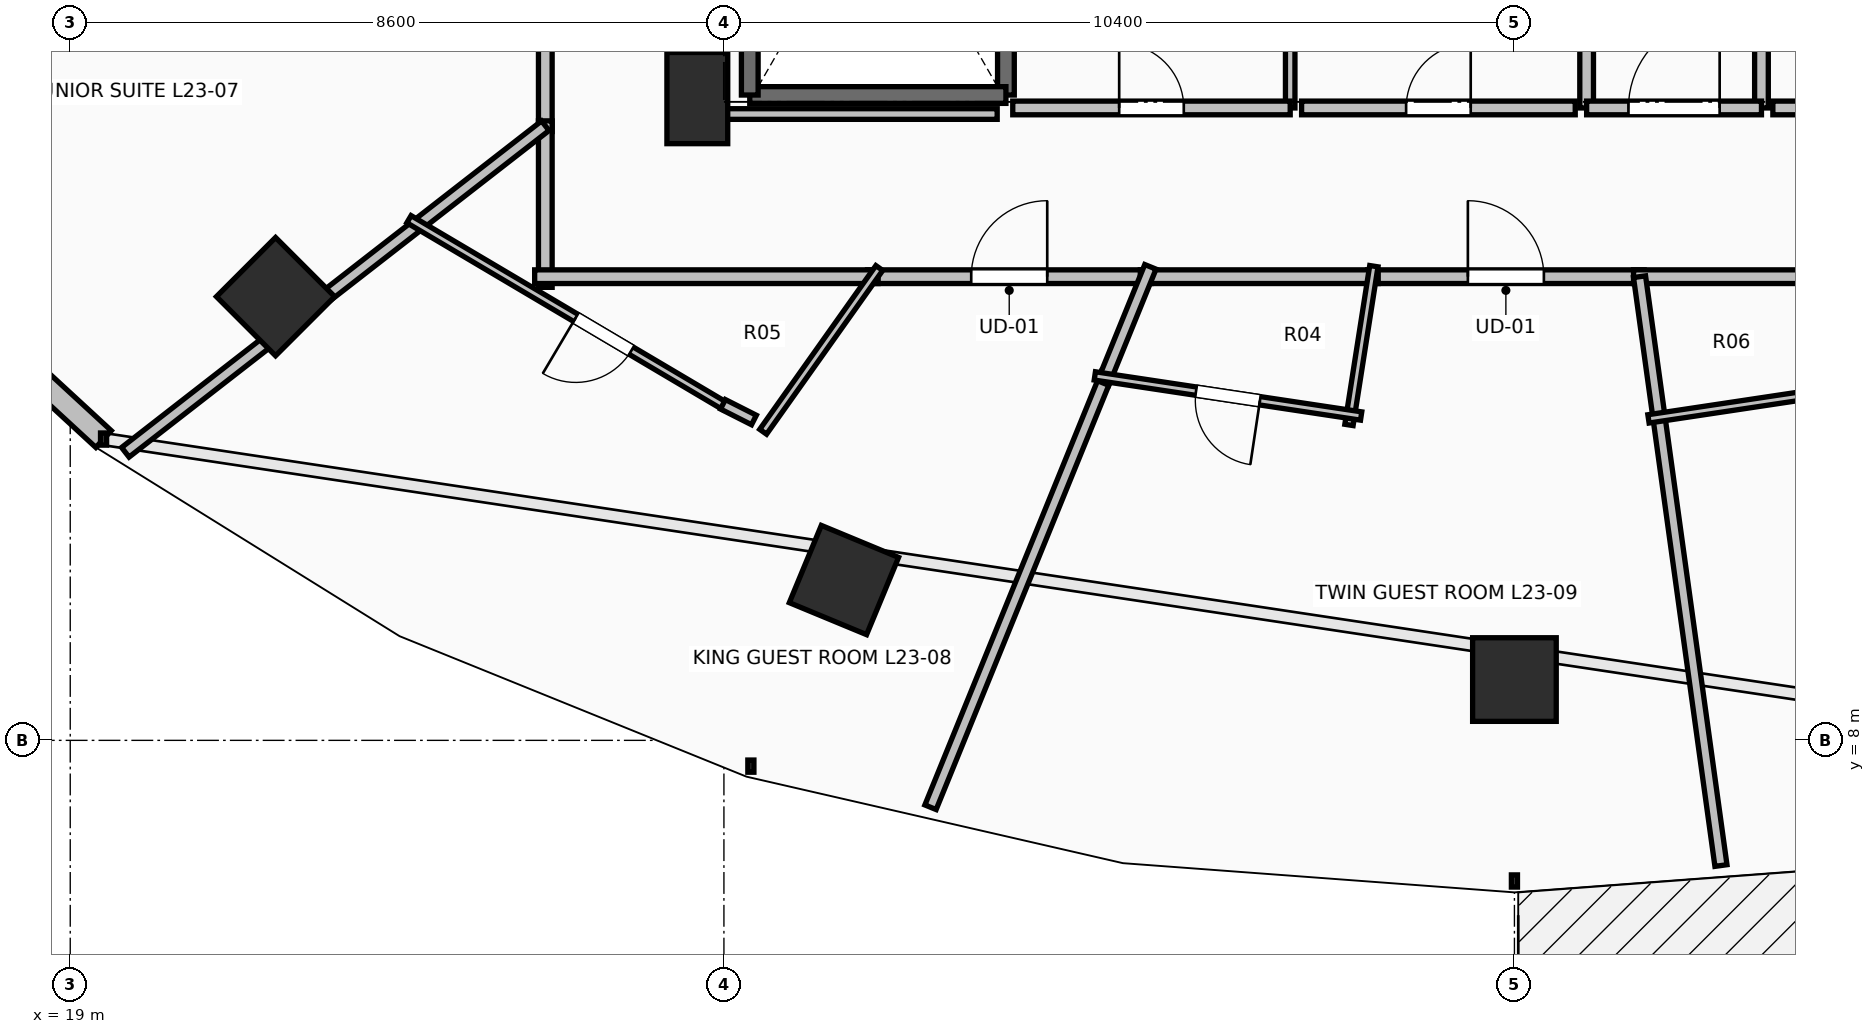
"""IFC4 building model, lengths in metres.
Left out: names, types, materials, properties, quantities, classifications, styles, units other than length and angle.
Written with IfcOpenShell. Run it as: python <this file> out.ifc"""

import sys

from ifc_helpers import new_model, si_unit, direction, frame, frame_2d, origin, origin_2d, place, context, subcontext, project, spatial, rectangle, extrude, element, fill, save


model = new_model("IFC4")
c1 = context("Model", 3, precision=1e-05, world=origin(), true_north=direction((0.0, 1.0)))
c2 = subcontext(c1, "Body", "Model", "MODEL_VIEW")
j1 = project(units=[si_unit("LENGTHUNIT", "METRE"), si_unit("PLANEANGLEUNIT", "RADIAN")], contexts=[c1])
p1 = place(None, origin())
s1 = spatial("IfcSite", under=j1, at=p1, CompositionType="ELEMENT")
p2 = place(p1, origin())
s2 = spatial("IfcBuilding", under=s1, at=p2, CompositionType="ELEMENT")
p3 = place(p2, frame((0.0, 0.0, 89.3)))
s3 = spatial("IfcBuildingStorey", under=s2, at=p3, CompositionType="ELEMENT", Elevation=89.3)
for number, where, z_axis, x_axis in (
    (1, (21.701, 13.838, 0.0), (0.0, 0.0, 1.0), (-0.707, -0.707, 0.0)),
    (2, (29.179, 10.109, 0.0), (0.0, 0.0, 1.0), (-0.383, -0.924, 0.0)),
    (3, (38.0, 8.8, 0.0), (0.0, 0.0, 1.0), (0.0, -1.0, 0.0)),
):
    element("IfcColumn", number, at=place(p3, frame(where, z_axis=z_axis, x_axis=x_axis)), inside=s3, PredefinedType="COLUMN", context=c2, shape_type="SweptSolid", body=[
        extrude(rectangle(XDim=1.1, YDim=1.1, at=origin_2d()), origin(), (0.0, 0.0, 1.0), 3.5),
    ])
p4 = place(p3, frame((27.25, 16.45, 0.0), z_axis=(0.0, 0.0, 1.0), x_axis=(1.0, 0.0, 0.0)))
e4 = element("IfcColumn", 4, at=p4, inside=s3, PredefinedType="PILASTER", context=c2, shape_type="SweptSolid", body=[
    extrude(rectangle(XDim=0.8, YDim=1.2, at=origin_2d()), origin(), (0.0, 0.0, 1.0), 3.5),
])
p5 = place(p3, frame((16.174, 14.972, 0.0), z_axis=(0.0, 0.0, 1.0), x_axis=(0.735416718093, -0.677615119924, 0.0)))
e5 = element("IfcWall", 5, at=p5, inside=s3, PredefinedType="STANDARD", context=c2, shape_type="SweptSolid", body=[
    extrude(rectangle(XDim=4.439, YDim=0.3, at=frame_2d((2.22, 0.0))), origin(), (0.0, 0.0, 1.0), 3.24),
])
p6 = place(p5, frame((1.32, 0.0, 0.85)))
e6 = element("IfcOpeningElement", 6, at=p6, cuts=e5, PredefinedType="OPENING", context=c2, shape_type="SweptSolid", body=[
    extrude(rectangle(XDim=1.8, YDim=2.19, at=frame_2d((0.9, 1.095))), frame((0.0, 0.165, 0.0), z_axis=(0.0, -1.0, 0.0), x_axis=(1.0, 0.0, 0.0)), (0.0, 0.0, 1.0), 0.33),
])
p7 = place(p3, frame((31.31, 23.91, 0.0), z_axis=(0.0, 0.0, 1.0), x_axis=(0.0, -1.0, 0.0)))
e7 = element("IfcWall", 7, at=p7, inside=s3, PredefinedType="SOLIDWALL", context=c2, shape_type="SweptSolid", body=[
    extrude(rectangle(XDim=7.42, YDim=0.22, at=frame_2d((3.71, 0.0))), origin(), (0.0, 0.0, 1.0), 3.24),
])
p8 = place(p3, frame((31.31, 16.49, 0.0), z_axis=(0.0, 0.0, 1.0), x_axis=(-1.0, 0.0, 0.0)))
e8 = element("IfcWall", 8, at=p8, inside=s3, PredefinedType="SOLIDWALL", context=c2, shape_type="SweptSolid", body=[
    extrude(rectangle(XDim=3.37, YDim=0.22, at=frame_2d((1.685, 0.0))), origin(), (0.0, 0.0, 1.0), 3.24),
])
p9 = place(p3, frame((27.94, 16.49, 0.0), z_axis=(0.0, 0.0, 1.0), x_axis=(0.0, 1.0, 0.0)))
e9 = element("IfcWall", 9, at=p9, inside=s3, PredefinedType="SOLIDWALL", context=c2, shape_type="SweptSolid", body=[
    extrude(rectangle(XDim=7.42, YDim=0.22, at=frame_2d((3.71, 0.0))), origin(), (0.0, 0.0, 1.0), 3.24),
])
p10 = place(p3, frame((41.25, 16.32, 0.0), z_axis=(0.0, 0.0, 1.0), x_axis=(0.0, 1.0, 0.0)))
e10 = element("IfcWall", 10, at=p10, inside=s3, PredefinedType="PARTITIONING", context=c2, shape_type="SweptSolid", body=[
    extrude(rectangle(XDim=7.88, YDim=0.18, at=frame_2d((3.94, 0.0))), origin(), (0.0, 0.0, 1.0), 3.24),
])
p11 = place(p10, frame((3.54, 0.0, 0.0)))
e11 = element("IfcOpeningElement", 11, at=p11, cuts=e10, PredefinedType="OPENING", context=c2, shape_type="SweptSolid", body=[
    extrude(rectangle(XDim=0.8, YDim=2.05, at=frame_2d((0.4, 1.025))), frame((0.0, 0.105, 0.0), z_axis=(0.0, -1.0, 0.0), x_axis=(1.0, 0.0, 0.0)), (0.0, 0.0, 1.0), 0.21),
])
p12 = place(p3, frame((38.95, 21.755, 0.0), z_axis=(0.0, 0.0, 1.0), x_axis=(0.0, -1.0, 0.0)))
e12 = element("IfcWall", 12, at=p12, inside=s3, PredefinedType="PARTITIONING", context=c2, shape_type="SweptSolid", body=[
    extrude(rectangle(XDim=5.435, YDim=0.18, at=frame_2d((2.717, 0.0))), origin(), (0.0, 0.0, 1.0), 3.24),
])
p13 = place(p12, frame((2.292, 0.0, 0.0)))
e13 = element("IfcOpeningElement", 13, at=p13, cuts=e12, PredefinedType="OPENING", context=c2, shape_type="SweptSolid", body=[
    extrude(rectangle(XDim=0.85, YDim=2.1, at=frame_2d((0.425, 1.05))), frame((0.0, 0.105, 0.0), z_axis=(0.0, -1.0, 0.0), x_axis=(1.0, 0.0, 0.0)), (0.0, 0.0, 1.0), 0.21),
])
p14 = place(p3, frame((38.95, 16.32, 0.0), z_axis=(0.0, 0.0, 1.0), x_axis=(1.0, 0.0, 0.0)))
e14 = element("IfcWall", 14, at=p14, inside=s3, PredefinedType="PARTITIONING", context=c2, shape_type="SweptSolid", body=[
    extrude(rectangle(XDim=2.3, YDim=0.18, at=frame_2d((1.15, 0.0))), origin(), (0.0, 0.0, 1.0), 3.24),
])
p15 = place(p14, frame((0.55, 0.0, 0.0)))
e15 = element("IfcOpeningElement", 15, at=p15, cuts=e14, PredefinedType="OPENING", context=c2, shape_type="SweptSolid", body=[
    extrude(rectangle(XDim=1.2, YDim=2.15, at=frame_2d((0.6, 1.075))), frame((0.0, 0.105, 0.0), z_axis=(0.0, -1.0, 0.0), x_axis=(1.0, 0.0, 0.0)), (0.0, 0.0, 1.0), 0.21),
])
p16 = place(p3, frame((41.4, 16.32, 0.0), z_axis=(0.0, 0.0, 1.0), x_axis=(1.0, 0.0, 0.0)))
e16 = element("IfcWall", 16, at=p16, inside=s3, PredefinedType="PARTITIONING", context=c2, shape_type="SweptSolid", body=[
    extrude(rectangle(XDim=3.2, YDim=0.18, at=frame_2d((1.6, 0.0))), origin(), (0.0, 0.0, 1.0), 3.24),
])
p17 = place(p16, frame((1.2, 0.0, 0.0)))
e17 = element("IfcOpeningElement", 17, at=p17, cuts=e16, PredefinedType="OPENING", context=c2, shape_type="SweptSolid", body=[
    extrude(rectangle(XDim=0.8, YDim=2.05, at=frame_2d((0.4, 1.025))), frame((0.0, 0.105, 0.0), z_axis=(0.0, -1.0, 0.0), x_axis=(1.0, 0.0, 0.0)), (0.0, 0.0, 1.0), 0.21),
])
p18 = place(p3, frame((35.05, 16.32, 0.0), z_axis=(0.0, 0.0, 1.0), x_axis=(0.0, 1.0, 0.0)))
e18 = element("IfcWall", 18, at=p18, inside=s3, PredefinedType="PARTITIONING", context=c2, shape_type="SweptSolid", body=[
    extrude(rectangle(XDim=5.13, YDim=0.125, at=frame_2d((2.565, 0.0))), origin(), (0.0, 0.0, 1.0), 3.24),
])
p19 = place(p3, frame((31.4, 16.32, 0.0), z_axis=(0.0, 0.0, 1.0), x_axis=(1.0, 0.0, 0.0)))
e19 = element("IfcWall", 19, at=p19, inside=s3, PredefinedType="PARTITIONING", context=c2, shape_type="SweptSolid", body=[
    extrude(rectangle(XDim=3.65, YDim=0.18, at=frame_2d((1.825, 0.0))), origin(), (0.0, 0.0, 1.0), 3.24),
])
p20 = place(p19, frame((1.4, 0.0, 0.0)))
e20 = element("IfcOpeningElement", 20, at=p20, cuts=e19, PredefinedType="OPENING", context=c2, shape_type="SweptSolid", body=[
    extrude(rectangle(XDim=0.85, YDim=2.1, at=frame_2d((0.425, 1.05))), frame((0.0, 0.105, 0.0), z_axis=(0.0, -1.0, 0.0), x_axis=(1.0, 0.0, 0.0)), (0.0, 0.0, 1.0), 0.21),
])
p21 = place(p3, frame((35.2, 16.32, 0.0), z_axis=(0.0, 0.0, 1.0), x_axis=(1.0, 0.0, 0.0)))
e21 = element("IfcWall", 21, at=p21, inside=s3, PredefinedType="PARTITIONING", context=c2, shape_type="SweptSolid", body=[
    extrude(rectangle(XDim=3.6, YDim=0.18, at=frame_2d((1.8, 0.0))), origin(), (0.0, 0.0, 1.0), 3.24),
])
p22 = place(p21, frame((1.375, 0.0, 0.0)))
e22 = element("IfcOpeningElement", 22, at=p22, cuts=e21, PredefinedType="OPENING", context=c2, shape_type="SweptSolid", body=[
    extrude(rectangle(XDim=0.85, YDim=2.1, at=frame_2d((0.425, 1.05))), frame((0.0, 0.105, 0.0), z_axis=(0.0, -1.0, 0.0), x_axis=(1.0, 0.0, 0.0)), (0.0, 0.0, 1.0), 0.21),
])
p23 = place(p3, frame((25.25, 21.147, 0.0), z_axis=(0.0, 0.0, 1.0), x_axis=(0.0, -1.0, 0.0)))
e23 = element("IfcWall", 23, at=p23, inside=s3, PredefinedType="PARTITIONING", context=c2, shape_type="SweptSolid", body=[
    extrude(rectangle(XDim=5.137, YDim=0.18, at=frame_2d((2.568, 0.0))), origin(), (0.0, 0.0, 1.0), 2.432),
])
p24 = place(p23, frame((2.043, 0.0, 0.0)))
e24 = element("IfcOpeningElement", 24, at=p24, cuts=e23, PredefinedType="OPENING", context=c2, shape_type="SweptSolid", body=[
    extrude(rectangle(XDim=1.05, YDim=2.2, at=frame_2d((0.525, 1.1))), frame((0.0, 0.105, 0.0), z_axis=(0.0, -1.0, 0.0), x_axis=(1.0, 0.0, 0.0)), (0.0, 0.0, 1.0), 0.21),
])
p25 = place(p3, frame((29.489, 14.1, 0.0), z_axis=(0.0, 0.0, 1.0), x_axis=(1.0, 0.0, 0.0)))
e25 = element("IfcWall", 25, at=p25, inside=s3, PredefinedType="PARTITIONING", context=c2, shape_type="SweptSolid", body=[
    extrude(rectangle(XDim=3.729, YDim=0.18, at=frame_2d((1.865, 0.0))), origin(), (0.0, 0.0, 1.0), 3.24),
])
p26 = place(p25, frame((1.365, 0.0, 0.0)))
e26 = element("IfcOpeningElement", 26, at=p26, cuts=e25, PredefinedType="OPENING", context=c2, shape_type="SweptSolid", body=[
    extrude(rectangle(XDim=1.0, YDim=2.15, at=frame_2d((0.5, 1.075))), frame((0.0, 0.105, 0.0), z_axis=(0.0, -1.0, 0.0), x_axis=(1.0, 0.0, 0.0)), (0.0, 0.0, 1.0), 0.21),
])
p27 = place(p3, frame((25.25, 16.15, 0.0), z_axis=(0.0, 0.0, 1.0), x_axis=(0.0, -1.0, 0.0)))
e27 = element("IfcWall", 27, at=p27, inside=s3, PredefinedType="PARTITIONING", context=c2, shape_type="SweptSolid", body=[
    extrude(rectangle(XDim=2.19, YDim=0.18, at=frame_2d((1.095, 0.0))), origin(), (0.0, 0.0, 1.0), 2.432),
])
p28 = place(p3, frame((25.11, 14.1, 0.0), z_axis=(0.0, 0.0, 1.0), x_axis=(1.0, 0.0, 0.0)))
e28 = element("IfcWall", 28, at=p28, inside=s3, PredefinedType="PARTITIONING", context=c2, shape_type="SweptSolid", body=[
    extrude(rectangle(XDim=4.519, YDim=0.18, at=frame_2d((2.259, 0.0))), origin(), (0.0, 0.0, 1.0), 2.432),
])
p29 = place(p3, frame((36.068, 14.1, 0.0), z_axis=(0.0, 0.0, 1.0), x_axis=(1.0, 0.0, 0.0)))
e29 = element("IfcWall", 29, at=p29, inside=s3, PredefinedType="PARTITIONING", context=c2, shape_type="SweptSolid", body=[
    extrude(rectangle(XDim=3.639, YDim=0.18, at=frame_2d((1.819, 0.0))), origin(), (0.0, 0.0, 1.0), 2.972),
])
p30 = place(p29, frame((1.32, 0.0, 0.0)))
e30 = element("IfcOpeningElement", 30, at=p30, cuts=e29, PredefinedType="OPENING", context=c2, shape_type="SweptSolid", body=[
    extrude(rectangle(XDim=1.0, YDim=2.15, at=frame_2d((0.5, 1.075))), frame((0.0, 0.105, 0.0), z_axis=(0.0, -1.0, 0.0), x_axis=(1.0, 0.0, 0.0)), (0.0, 0.0, 1.0), 0.21),
])
p31 = place(p3, frame((33.078, 14.1, 0.0), z_axis=(0.0, 0.0, 1.0), x_axis=(1.0, 0.0, 0.0)))
e31 = element("IfcWall", 31, at=p31, inside=s3, PredefinedType="PARTITIONING", context=c2, shape_type="SweptSolid", body=[
    extrude(rectangle(XDim=3.13, YDim=0.18, at=frame_2d((1.565, 0.0))), origin(), (0.0, 0.0, 1.0), 2.972),
])
p32 = place(p3, frame((39.567, 14.1, 0.0), z_axis=(0.0, 0.0, 1.0), x_axis=(1.0, 0.0, 0.0)))
e32 = element("IfcWall", 32, at=p32, inside=s3, PredefinedType="PARTITIONING", context=c2, shape_type="SweptSolid", body=[
    extrude(rectangle(XDim=2.773, YDim=0.18, at=frame_2d((1.387, 0.0))), origin(), (0.0, 0.0, 1.0), 2.972),
])
p33 = place(p3, frame((19.725, 11.79, 0.0), z_axis=(0.0, 0.0, 1.0), x_axis=(0.789438616042, 0.613829513384, 0.0)))
e33 = element("IfcWall", 33, at=p33, inside=s3, PredefinedType="PARTITIONING", context=c2, shape_type="SweptSolid", body=[
    extrude(rectangle(XDim=6.999, YDim=0.16, at=frame_2d((3.499, 0.0))), origin(), (0.0, 0.0, 1.0), 2.432),
])
p34 = place(p3, frame((27.611, 12.399, 0.0), z_axis=(0.0, 0.0, 1.0), x_axis=(-0.860667615303, 0.509167218081, 0.0)))
e34 = element("IfcWall", 34, at=p34, inside=s3, PredefinedType="PARTITIONING", context=c2, shape_type="SweptSolid", body=[
    extrude(rectangle(XDim=4.827, YDim=0.11, at=frame_2d((2.413, 0.0))), origin(), (0.0, 0.0, 1.0), 2.432),
])
p35 = place(p34, frame((1.428, 0.0, 0.0)))
e35 = element("IfcOpeningElement", 35, at=p35, cuts=e34, PredefinedType="OPENING", context=c2, shape_type="SweptSolid", body=[
    extrude(rectangle(XDim=0.85, YDim=2.1, at=frame_2d((0.425, 1.05))), frame((0.0, 0.07, 0.0), z_axis=(0.0, -1.0, 0.0), x_axis=(1.0, 0.0, 0.0)), (0.0, 0.0, 1.0), 0.14),
])
p36 = place(p3, frame((29.644, 14.214, 0.0), z_axis=(0.0, 0.0, 1.0), x_axis=(-0.578550668744, -0.815646445279, 0.0)))
e36 = element("IfcWall", 36, at=p36, inside=s3, PredefinedType="PARTITIONING", context=c2, shape_type="SweptSolid", body=[
    extrude(rectangle(XDim=2.641, YDim=0.11, at=frame_2d((1.321, 0.0))), origin(), (0.0, 0.0, 1.0), 2.432),
])
p37 = place(p3, frame((30.318, 7.12, 0.0), z_axis=(0.0, 0.0, 1.0), x_axis=(0.376920780929, 0.926245499263, 0.0)))
e37 = element("IfcWall", 37, at=p37, inside=s3, PredefinedType="PARTITIONING", context=c2, shape_type="SweptSolid", body=[
    extrude(rectangle(XDim=6.166, YDim=0.16, at=frame_2d((3.083, 0.0))), origin(), (0.0, 0.0, 1.0), 2.677),
])
p38 = place(p3, frame((32.589, 12.701, 0.0), z_axis=(0.0, 0.0, 1.0), x_axis=(0.376742177728, 0.926318158907, 0.0)))
e38 = element("IfcWall", 38, at=p38, inside=s3, PredefinedType="PARTITIONING", context=c2, shape_type="SweptSolid", body=[
    extrude(rectangle(XDim=1.65, YDim=0.16, at=frame_2d((0.825, 0.0))), origin(), (0.0, 0.0, 1.0), 2.972),
])
p39 = place(p3, frame((36.151, 14.238, 0.0), z_axis=(0.0, 0.0, 1.0), x_axis=(-0.15485948048, -0.987936506718, 0.0)))
e39 = element("IfcWall", 39, at=p39, inside=s3, PredefinedType="PARTITIONING", context=c2, shape_type="SweptSolid", body=[
    extrude(rectangle(XDim=2.114, YDim=0.11, at=frame_2d((1.057, 0.0))), origin(), (0.0, 0.0, 1.0), 2.922),
])
p40 = place(p3, frame((35.983, 12.267, 0.0), z_axis=(0.0, 0.0, 1.0), x_axis=(-0.988843169739, 0.148960349288, 0.0)))
e40 = element("IfcWall", 40, at=p40, inside=s3, PredefinedType="PARTITIONING", context=c2, shape_type="SweptSolid", body=[
    extrude(rectangle(XDim=3.543, YDim=0.11, at=frame_2d((1.772, 0.0))), origin(), (0.0, 0.0, 1.0), 2.922),
])
p41 = place(p40, frame((1.347, 0.0, 0.0)))
e41 = element("IfcOpeningElement", 41, at=p41, cuts=e40, PredefinedType="OPENING", context=c2, shape_type="SweptSolid", body=[
    extrude(rectangle(XDim=0.85, YDim=2.1, at=frame_2d((0.425, 1.05))), frame((0.0, 0.07, 0.0), z_axis=(0.0, -1.0, 0.0), x_axis=(1.0, 0.0, 0.0)), (0.0, 0.0, 1.0), 0.14),
])
p42 = place(p3, frame((40.717, 6.353, 0.0), z_axis=(0.0, 0.0, 1.0), x_axis=(-0.136949014068, 0.990578097651, 0.0)))
e42 = element("IfcWall", 42, at=p42, inside=s3, PredefinedType="PARTITIONING", context=c2, shape_type="SweptSolid", body=[
    extrude(rectangle(XDim=7.821, YDim=0.16, at=frame_2d((3.91, 0.0))), origin(), (0.0, 0.0, 1.0), 2.432),
])
p43 = place(p3, frame((44.961, 13.011, 0.0), z_axis=(0.0, 0.0, 1.0), x_axis=(-0.98888518965, -0.148681141008, 0.0)))
e43 = element("IfcWall", 43, at=p43, inside=s3, PredefinedType="PARTITIONING", context=c2, shape_type="SweptSolid", body=[
    extrude(rectangle(XDim=5.256, YDim=0.11, at=frame_2d((2.628, 0.0))), origin(), (0.0, 0.0, 1.0), 2.432),
])
p44 = place(p43, frame((2.203, 0.0, 0.0)))
e44 = element("IfcOpeningElement", 44, at=p44, cuts=e43, PredefinedType="OPENING", context=c2, shape_type="SweptSolid", body=[
    extrude(rectangle(XDim=0.85, YDim=2.1, at=frame_2d((0.425, 1.05))), frame((0.0, 0.07, 0.0), z_axis=(0.0, -1.0, 0.0), x_axis=(1.0, 0.0, 0.0)), (0.0, 0.0, 1.0), 0.14),
])
p45 = place(p3, frame((31.195, 16.24, 0.0), z_axis=(0.0, 0.0, 1.0), x_axis=(-1.0, 0.0, 0.0)))
e45 = element("IfcWall", 45, at=p45, inside=s3, PredefinedType="PARTITIONING", context=c2, shape_type="SweptSolid", body=[
    extrude(rectangle(XDim=3.745, YDim=0.14, at=frame_2d((1.873, 0.0))), origin(), (0.0, 0.0, 1.0), 2.432),
])
p46 = place(p3, frame((27.45, 16.24, 0.0), z_axis=(0.0, 0.0, 1.0), x_axis=(0.0, 1.0, 0.0)))
e46 = element("IfcWall", 46, at=p46, inside=s3, PredefinedType="PARTITIONING", context=c2, shape_type="SweptSolid", body=[
    extrude(rectangle(XDim=7.514, YDim=0.14, at=frame_2d((3.757, 0.0))), origin(), (0.0, 0.0, 1.0), 2.432),
])
p47 = place(p3, frame((27.587, 12.421, 0.0), z_axis=(0.0, 0.0, 1.0), x_axis=(0.892279780373, -0.451482882884, 0.0)))
e47 = element("IfcWall", 47, at=p47, inside=s3, PredefinedType="PARTITIONING", context=c2, shape_type="SweptSolid", body=[
    extrude(rectangle(XDim=0.457, YDim=0.14, at=frame_2d((0.229, 0.0))), origin(), (0.0, 0.0, 1.0), 3.24),
])
p48 = place(p15, origin())
e48 = element("IfcDoor", 48, at=p48, inside=s3, OperationType="SINGLE_SWING_RIGHT", PredefinedType="DOOR", context=c2, shape_type="SweptSolid", body=[
    extrude(rectangle(XDim=1.2, YDim=2.15, at=frame_2d((0.6, 1.075))), frame((0.0, 0.025, 0.0), z_axis=(0.0, -1.0, 0.0), x_axis=(1.0, 0.0, 0.0)), (0.0, 0.0, 1.0), 0.05),
])
fill(e15, e48)
p49 = place(p20, origin())
e49 = element("IfcDoor", 49, at=p49, inside=s3, OperationType="SINGLE_SWING_LEFT", PredefinedType="DOOR", context=c2, shape_type="SweptSolid", body=[
    extrude(rectangle(XDim=0.85, YDim=2.1, at=frame_2d((0.425, 1.05))), frame((0.0, 0.025, 0.0), z_axis=(0.0, -1.0, 0.0), x_axis=(1.0, 0.0, 0.0)), (0.0, 0.0, 1.0), 0.05),
])
fill(e20, e49)
p50 = place(p22, origin())
e50 = element("IfcDoor", 50, at=p50, inside=s3, OperationType="SINGLE_SWING_RIGHT", PredefinedType="DOOR", context=c2, shape_type="SweptSolid", body=[
    extrude(rectangle(XDim=0.85, YDim=2.1, at=frame_2d((0.425, 1.05))), frame((0.0, 0.025, 0.0), z_axis=(0.0, -1.0, 0.0), x_axis=(1.0, 0.0, 0.0)), (0.0, 0.0, 1.0), 0.05),
])
fill(e22, e50)
p51 = place(p26, origin())
e51 = element("IfcDoor", 51, at=p51, inside=s3, OperationType="SINGLE_SWING_RIGHT", PredefinedType="DOOR", context=c2, shape_type="SweptSolid", body=[
    extrude(rectangle(XDim=1.0, YDim=2.15, at=frame_2d((0.5, 1.075))), frame((0.0, 0.025, 0.0), z_axis=(0.0, -1.0, 0.0), x_axis=(1.0, 0.0, 0.0)), (0.0, 0.0, 1.0), 0.05),
])
fill(e26, e51)
p52 = place(p30, origin())
e52 = element("IfcDoor", 52, at=p52, inside=s3, OperationType="SINGLE_SWING_LEFT", PredefinedType="DOOR", context=c2, shape_type="SweptSolid", body=[
    extrude(rectangle(XDim=1.0, YDim=2.15, at=frame_2d((0.5, 1.075))), frame((0.0, 0.025, 0.0), z_axis=(0.0, -1.0, 0.0), x_axis=(1.0, 0.0, 0.0)), (0.0, 0.0, 1.0), 0.05),
])
fill(e30, e52)
p53 = place(p35, origin())
e53 = element("IfcDoor", 53, at=p53, inside=s3, OperationType="SINGLE_SWING_RIGHT", PredefinedType="DOOR", context=c2, shape_type="SweptSolid", body=[
    extrude(rectangle(XDim=0.85, YDim=2.1, at=frame_2d((0.425, 1.05))), frame((0.0, 0.025, 0.0), z_axis=(0.0, -1.0, 0.0), x_axis=(1.0, 0.0, 0.0)), (0.0, 0.0, 1.0), 0.05),
])
fill(e35, e53)
p54 = place(p41, origin())
e54 = element("IfcDoor", 54, at=p54, inside=s3, OperationType="SINGLE_SWING_LEFT", PredefinedType="DOOR", context=c2, shape_type="SweptSolid", body=[
    extrude(rectangle(XDim=0.85, YDim=2.1, at=frame_2d((0.425, 1.05))), frame((0.0, 0.025, 0.0), z_axis=(0.0, -1.0, 0.0), x_axis=(1.0, 0.0, 0.0)), (0.0, 0.0, 1.0), 0.05),
])
fill(e41, e54)
save(model, sys.argv[1])
